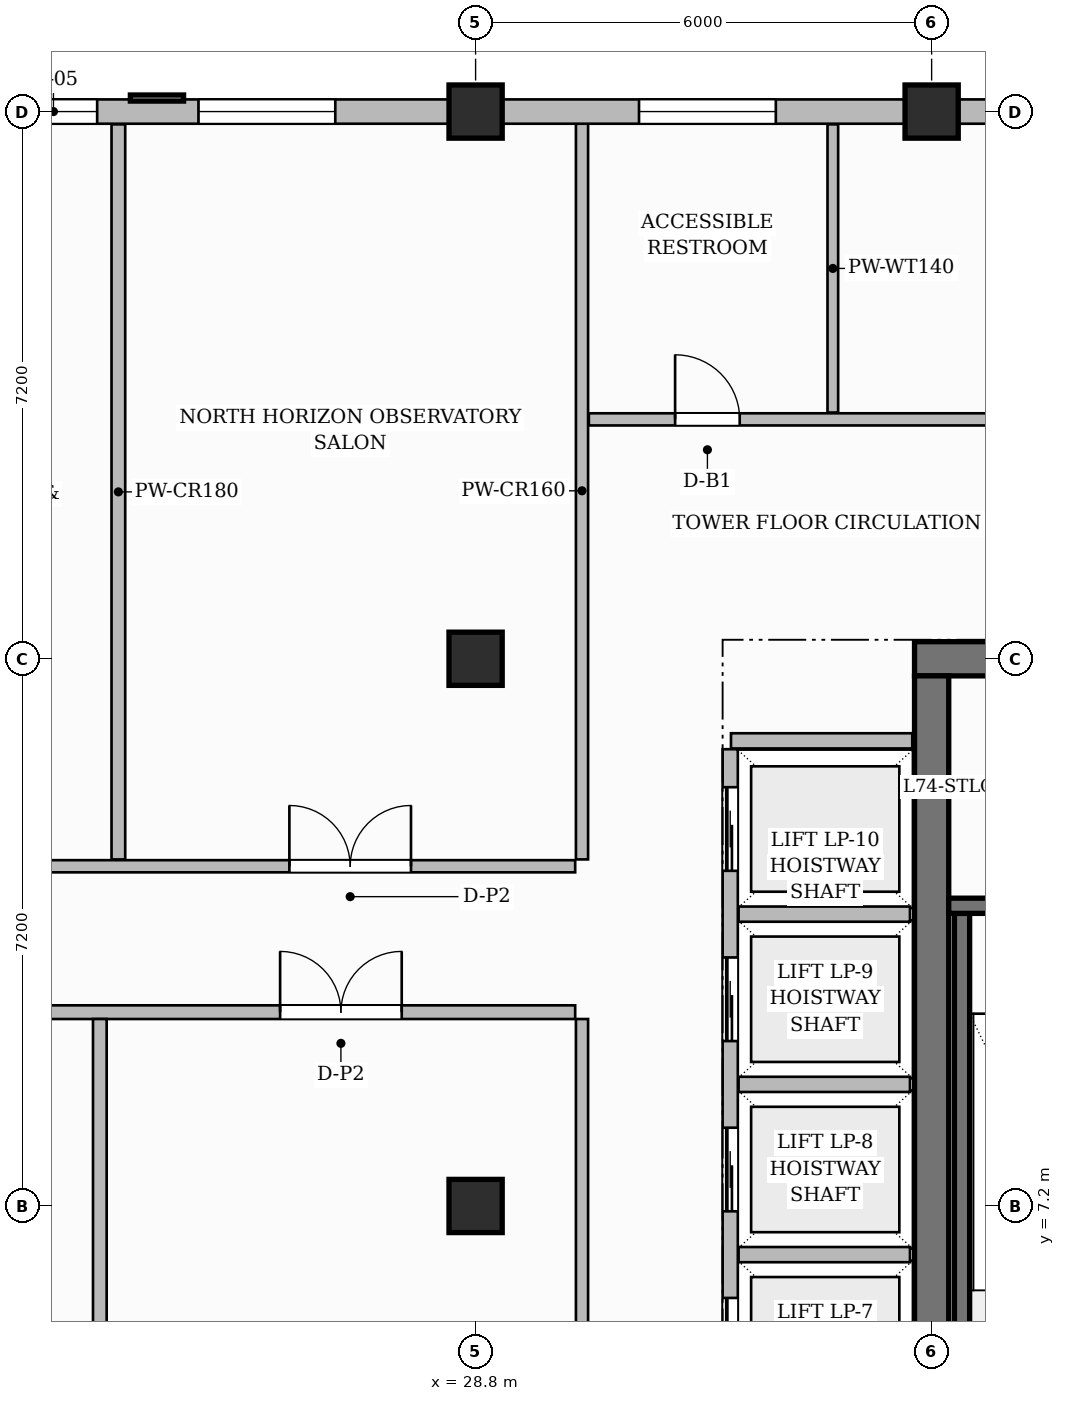
"""IFC4 building model, lengths in metres.
Left out: names, types, materials, properties, quantities, classifications, styles, units other than length and angle.
Written with IfcOpenShell. Run it as: python <this file> out.ifc"""

import sys

from ifc_helpers import new_model, si_unit, direction, frame, frame_2d, origin, origin_2d, place, context, subcontext, project, spatial, rectangle, extrude, source, transform, mapped, element, fill, save


model = new_model("IFC4")
c1 = context("Model", 3, precision=1e-05, world=origin(), true_north=direction((0.0, 1.0)))
c2 = subcontext(c1, "Body", "Model", "MODEL_VIEW")
j1 = project(units=[si_unit("LENGTHUNIT", "METRE"), si_unit("PLANEANGLEUNIT", "RADIAN")], contexts=[c1])
p1 = place(None, origin())
s1 = spatial("IfcSite", under=j1, at=p1, CompositionType="ELEMENT")
p2 = place(p1, origin())
s2 = spatial("IfcBuilding", under=s1, at=p2, CompositionType="ELEMENT")
p3 = place(p2, frame((0.0, 0.0, 294.3)))
s3 = spatial("IfcBuildingStorey", under=s2, at=p3, CompositionType="ELEMENT", Elevation=294.3)
p4 = place(p3, frame((34.575, 14.4, 0.0), z_axis=(0.0, 0.0, 1.0), x_axis=(1.0, 0.0, 0.0)))
e1 = element("IfcWall", 1, at=p4, inside=s3, PredefinedType="SHEAR", context=c2, shape_type="SweptSolid", body=[
    extrude(rectangle(XDim=15.45, YDim=0.45, at=frame_2d((7.725, 0.0))), origin(), (0.0, 0.0, 1.0), 4.8),
])
p5 = place(p4, frame((5.355, 0.0, 0.0)))
e2 = element("IfcOpeningElement", 2, at=p5, cuts=e1, PredefinedType="OPENING", context=c2, shape_type="SweptSolid", body=[
    extrude(rectangle(XDim=1.5, YDim=2.2, at=frame_2d((0.75, 1.1))), frame((0.0, 0.235, 0.0), z_axis=(0.0, -1.0, 0.0), x_axis=(1.0, 0.0, 0.0)), (0.0, 0.0, 1.0), 0.47),
])
p6 = place(p4, frame((1.57, 0.0, 0.0)))
e3 = element("IfcOpeningElement", 3, at=p6, cuts=e1, PredefinedType="OPENING", context=c2, shape_type="SweptSolid", body=[
    extrude(rectangle(XDim=1.05, YDim=2.15, at=frame_2d((0.525, 1.075))), frame((0.0, 0.235, 0.0), z_axis=(0.0, -1.0, 0.0), x_axis=(1.0, 0.0, 0.0)), (0.0, 0.0, 1.0), 0.47),
])
p7 = place(p4, frame((11.2, 0.0, 0.0)))
e4 = element("IfcOpeningElement", 4, at=p7, cuts=e1, PredefinedType="OPENING", context=c2, shape_type="SweptSolid", body=[
    extrude(rectangle(XDim=1.05, YDim=2.15, at=frame_2d((0.525, 1.075))), frame((0.0, 0.235, 0.0), z_axis=(0.0, -1.0, 0.0), x_axis=(1.0, 0.0, 0.0)), (0.0, 0.0, 1.0), 0.47),
])
p8 = place(p3, frame((34.8, 3.825, 0.0), z_axis=(0.0, 0.0, 1.0), x_axis=(0.0, 1.0, 0.0)))
e5 = element("IfcWall", 5, at=p8, inside=s3, PredefinedType="SHEAR", context=c2, shape_type="SweptSolid", body=[
    extrude(rectangle(XDim=10.35, YDim=0.45, at=frame_2d((5.175, 0.0))), origin(), (0.0, 0.0, 1.0), 4.8),
])
m1 = source(origin(), c2, "Body", "SweptSolid", [
    extrude(rectangle(XDim=0.7, YDim=0.7, at=origin_2d()), origin(), (0.0, 0.0, 1.0), 4.8),
])
for number, where, z_axis, x_axis in (
    (6, (28.8, 7.2, 0.0), (0.0, 0.0, 1.0), (1.0, 0.0, 0.0)),
    (7, (28.8, 14.4, 0.0), (0.0, 0.0, 1.0), (1.0, 0.0, 0.0)),
    (8, (28.8, 21.6, 0.0), (0.0, 0.0, 1.0), (1.0, 0.0, 0.0)),
    (9, (34.8, 21.6, 0.0), (0.0, 0.0, 1.0), (1.0, 0.0, 0.0)),
):
    element("IfcColumn", number, at=place(p3, frame(where, z_axis=z_axis, x_axis=x_axis)), inside=s3, PredefinedType="COLUMN", context=c2, shape_type="MappedRepresentation", body=[
        mapped(m1, transform((0.0, 0.0, 0.0), scale=1.0)),
    ])
p9 = place(p3, frame((35.2, 4.1, 0.0), z_axis=(0.0, 0.0, 1.0), x_axis=(0.0, 1.0, 0.0)))
e10 = element("IfcWall", 10, at=p9, inside=s3, PredefinedType="SHEAR", context=c2, shape_type="SweptSolid", body=[
    extrude(rectangle(XDim=6.95, YDim=0.2, at=frame_2d((3.475, 0.0))), origin(), (0.0, 0.0, 1.0), 4.8),
])
p10 = place(p3, frame((35.025, 11.15, 0.0), z_axis=(0.0, 0.0, 1.0), x_axis=(1.0, 0.0, 0.0)))
e11 = element("IfcWall", 11, at=p10, inside=s3, PredefinedType="SHEAR", context=c2, shape_type="SweptSolid", body=[
    extrude(rectangle(XDim=3.215, YDim=0.2, at=frame_2d((1.607, 0.0))), origin(), (0.0, 0.0, 1.0), 4.8),
])
p11 = place(p10, frame((1.12, 0.0, 0.0)))
e12 = element("IfcOpeningElement", 12, at=p11, cuts=e11, PredefinedType="OPENING", context=c2, shape_type="SweptSolid", body=[
    extrude(rectangle(XDim=1.05, YDim=2.2, at=frame_2d((0.525, 1.1))), frame((0.0, 0.11, 0.0), z_axis=(0.0, -1.0, 0.0), x_axis=(1.0, 0.0, 0.0)), (0.0, 0.0, 1.0), 0.22),
])
p12 = place(p3, frame((32.16, 13.32, 0.0), z_axis=(0.0, 0.0, 1.0), x_axis=(1.0, 0.0, 0.0)))
e13 = element("IfcWall", 13, at=p12, inside=s3, PredefinedType="PARTITIONING", context=c2, shape_type="SweptSolid", body=[
    extrude(rectangle(XDim=2.385, YDim=0.2, at=frame_2d((1.192, 0.0))), origin(), (0.0, 0.0, 1.0), 4.5),
])
p13 = place(p3, frame((32.15, 4.39, 0.0), z_axis=(0.0, 0.0, 1.0), x_axis=(0.0, 1.0, 0.0)))
e14 = element("IfcWall", 14, at=p13, inside=s3, PredefinedType="PARTITIONING", context=c2, shape_type="SweptSolid", body=[
    extrude(rectangle(XDim=8.82, YDim=0.2, at=frame_2d((4.41, 0.0))), origin(), (0.0, 0.0, 1.0), 4.5),
])
p14 = place(p13, frame((0.5, 0.0, 0.0)))
e15 = element("IfcOpeningElement", 15, at=p14, cuts=e14, PredefinedType="OPENING", context=c2, shape_type="SweptSolid", body=[
    extrude(rectangle(XDim=1.1, YDim=2.2, at=frame_2d((0.55, 1.1))), frame((0.0, 0.11, 0.0), z_axis=(0.0, -1.0, 0.0), x_axis=(1.0, 0.0, 0.0)), (0.0, 0.0, 1.0), 0.22),
])
p15 = place(p13, frame((2.74, 0.0, 0.0)))
e16 = element("IfcOpeningElement", 16, at=p15, cuts=e14, PredefinedType="OPENING", context=c2, shape_type="SweptSolid", body=[
    extrude(rectangle(XDim=1.1, YDim=2.2, at=frame_2d((0.55, 1.1))), frame((0.0, 0.11, 0.0), z_axis=(0.0, -1.0, 0.0), x_axis=(1.0, 0.0, 0.0)), (0.0, 0.0, 1.0), 0.22),
])
p16 = place(p13, frame((4.98, 0.0, 0.0)))
e17 = element("IfcOpeningElement", 17, at=p16, cuts=e14, PredefinedType="OPENING", context=c2, shape_type="SweptSolid", body=[
    extrude(rectangle(XDim=1.1, YDim=2.2, at=frame_2d((0.55, 1.1))), frame((0.0, 0.11, 0.0), z_axis=(0.0, -1.0, 0.0), x_axis=(1.0, 0.0, 0.0)), (0.0, 0.0, 1.0), 0.22),
])
p17 = place(p13, frame((7.22, 0.0, 0.0)))
e18 = element("IfcOpeningElement", 18, at=p17, cuts=e14, PredefinedType="OPENING", context=c2, shape_type="SweptSolid", body=[
    extrude(rectangle(XDim=1.1, YDim=2.2, at=frame_2d((0.55, 1.1))), frame((0.0, 0.11, 0.0), z_axis=(0.0, -1.0, 0.0), x_axis=(1.0, 0.0, 0.0)), (0.0, 0.0, 1.0), 0.22),
])
for number, where, z_axis, x_axis in (
    (19, (32.26, 6.56, 0.0), (0.0, 0.0, 1.0), (1.0, 0.0, 0.0)),
    (20, (32.26, 8.8, 0.0), (0.0, 0.0, 1.0), (1.0, 0.0, 0.0)),
    (21, (32.26, 11.04, 0.0), (0.0, 0.0, 1.0), (1.0, 0.0, 0.0)),
):
    element("IfcWall", number, at=place(p3, frame(where, z_axis=z_axis, x_axis=x_axis)), inside=s3, PredefinedType="PARTITIONING", context=c2, shape_type="SweptSolid", body=[
        extrude(rectangle(XDim=2.255, YDim=0.2, at=frame_2d((1.127, 0.0))), origin(), (0.0, 0.0, 1.0), 4.5),
    ])
p18 = place(p3, frame((18.168, 9.75, 0.0), z_axis=(0.0, 0.0, 1.0), x_axis=(1.0, 0.0, 0.0)))
e22 = element("IfcWall", 22, at=p18, inside=s3, PredefinedType="PARTITIONING", context=c2, shape_type="SweptSolid", body=[
    extrude(rectangle(XDim=11.942, YDim=0.18, at=frame_2d((5.971, 0.0))), origin(), (0.0, 0.0, 1.0), 4.5),
])
p19 = place(p18, frame((1.96, 0.0, 0.0)))
e23 = element("IfcOpeningElement", 23, at=p19, cuts=e22, PredefinedType="OPENING", context=c2, shape_type="SweptSolid", body=[
    extrude(rectangle(XDim=1.6, YDim=2.4, at=frame_2d((0.8, 1.2))), frame((0.0, 0.1, 0.0), z_axis=(0.0, -1.0, 0.0), x_axis=(1.0, 0.0, 0.0)), (0.0, 0.0, 1.0), 0.2),
])
p20 = place(p18, frame((8.06, 0.0, 0.0)))
e24 = element("IfcOpeningElement", 24, at=p20, cuts=e22, PredefinedType="OPENING", context=c2, shape_type="SweptSolid", body=[
    extrude(rectangle(XDim=1.6, YDim=2.4, at=frame_2d((0.8, 1.2))), frame((0.0, 0.1, 0.0), z_axis=(0.0, -1.0, 0.0), x_axis=(1.0, 0.0, 0.0)), (0.0, 0.0, 1.0), 0.2),
])
p21 = place(p3, frame((18.168, 11.67, 0.0), z_axis=(0.0, 0.0, 1.0), x_axis=(1.0, 0.0, 0.0)))
e25 = element("IfcWall", 25, at=p21, inside=s3, PredefinedType="PARTITIONING", context=c2, shape_type="SweptSolid", body=[
    extrude(rectangle(XDim=11.942, YDim=0.16, at=frame_2d((5.971, 0.0))), origin(), (0.0, 0.0, 1.0), 4.5),
])
p22 = place(p21, frame((2.082, 0.0, 0.0)))
e26 = element("IfcOpeningElement", 26, at=p22, cuts=e25, PredefinedType="OPENING", context=c2, shape_type="SweptSolid", body=[
    extrude(rectangle(XDim=1.6, YDim=2.4, at=frame_2d((0.8, 1.2))), frame((0.0, 0.09, 0.0), z_axis=(0.0, -1.0, 0.0), x_axis=(1.0, 0.0, 0.0)), (0.0, 0.0, 1.0), 0.18),
])
p23 = place(p21, frame((8.182, 0.0, 0.0)))
e27 = element("IfcOpeningElement", 27, at=p23, cuts=e25, PredefinedType="OPENING", context=c2, shape_type="SweptSolid", body=[
    extrude(rectangle(XDim=1.6, YDim=2.4, at=frame_2d((0.8, 1.2))), frame((0.0, 0.09, 0.0), z_axis=(0.0, -1.0, 0.0), x_axis=(1.0, 0.0, 0.0)), (0.0, 0.0, 1.0), 0.18),
])
p24 = place(p3, frame((30.2, 11.76, 0.0), z_axis=(0.0, 0.0, 1.0), x_axis=(0.0, 1.0, 0.0)))
e28 = element("IfcWall", 28, at=p24, inside=s3, PredefinedType="PARTITIONING", context=c2, shape_type="SweptSolid", body=[
    extrude(rectangle(XDim=9.7, YDim=0.16, at=frame_2d((4.85, 0.0))), origin(), (0.0, 0.0, 1.0), 4.5),
])
p25 = place(p3, frame((30.29, 17.55, 0.0), z_axis=(0.0, 0.0, 1.0), x_axis=(1.0, 0.0, 0.0)))
e29 = element("IfcWall", 29, at=p25, inside=s3, PredefinedType="PARTITIONING", context=c2, shape_type="SweptSolid", body=[
    extrude(rectangle(XDim=19.37, YDim=0.16, at=frame_2d((9.685, 0.0))), origin(), (0.0, 0.0, 1.0), 4.5),
])
p26 = place(p25, frame((1.135, 0.0, 0.0)))
e30 = element("IfcOpeningElement", 30, at=p26, cuts=e29, PredefinedType="OPENING", context=c2, shape_type="SweptSolid", body=[
    extrude(rectangle(XDim=0.85, YDim=2.1, at=frame_2d((0.425, 1.05))), frame((0.0, 0.09, 0.0), z_axis=(0.0, -1.0, 0.0), x_axis=(1.0, 0.0, 0.0)), (0.0, 0.0, 1.0), 0.18),
])
p27 = place(p25, frame((5.71, 0.0, 0.0)))
e31 = element("IfcOpeningElement", 31, at=p27, cuts=e29, PredefinedType="OPENING", context=c2, shape_type="SweptSolid", body=[
    extrude(rectangle(XDim=0.9, YDim=2.15, at=frame_2d((0.45, 1.075))), frame((0.0, 0.09, 0.0), z_axis=(0.0, -1.0, 0.0), x_axis=(1.0, 0.0, 0.0)), (0.0, 0.0, 1.0), 0.18),
])
p28 = place(p25, frame((10.635, 0.0, 0.0)))
e32 = element("IfcOpeningElement", 32, at=p28, cuts=e29, PredefinedType="OPENING", context=c2, shape_type="SweptSolid", body=[
    extrude(rectangle(XDim=0.95, YDim=2.15, at=frame_2d((0.475, 1.075))), frame((0.0, 0.09, 0.0), z_axis=(0.0, -1.0, 0.0), x_axis=(1.0, 0.0, 0.0)), (0.0, 0.0, 1.0), 0.18),
])
p29 = place(p25, frame((16.235, 0.0, 0.0)))
e33 = element("IfcOpeningElement", 33, at=p29, cuts=e29, PredefinedType="OPENING", context=c2, shape_type="SweptSolid", body=[
    extrude(rectangle(XDim=0.95, YDim=2.15, at=frame_2d((0.475, 1.075))), frame((0.0, 0.09, 0.0), z_axis=(0.0, -1.0, 0.0), x_axis=(1.0, 0.0, 0.0)), (0.0, 0.0, 1.0), 0.18),
])
p30 = place(p3, frame((30.2, 0.168, 0.0), z_axis=(0.0, 0.0, 1.0), x_axis=(0.0, 1.0, 0.0)))
e34 = element("IfcWall", 34, at=p30, inside=s3, PredefinedType="PARTITIONING", context=c2, shape_type="SweptSolid", body=[
    extrude(rectangle(XDim=9.492, YDim=0.16, at=frame_2d((4.746, 0.0))), origin(), (0.0, 0.0, 1.0), 4.5),
])
p31 = place(p30, frame((1.957, 0.0, 0.0)))
e35 = element("IfcOpeningElement", 35, at=p31, cuts=e34, PredefinedType="OPENING", context=c2, shape_type="SweptSolid", body=[
    extrude(rectangle(XDim=1.05, YDim=2.15, at=frame_2d((0.525, 1.075))), frame((0.0, 0.09, 0.0), z_axis=(0.0, -1.0, 0.0), x_axis=(1.0, 0.0, 0.0)), (0.0, 0.0, 1.0), 0.18),
])
p32 = place(p3, frame((33.5, 17.64, 0.0), z_axis=(0.0, 0.0, 1.0), x_axis=(0.0, 1.0, 0.0)))
e36 = element("IfcWall", 36, at=p32, inside=s3, PredefinedType="PARTITIONING", context=c2, shape_type="SweptSolid", body=[
    extrude(rectangle(XDim=3.792, YDim=0.14, at=frame_2d((1.896, 0.0))), origin(), (0.0, 0.0, 1.0), 4.5),
])
p33 = place(p3, frame((23.856, 0.168, 0.0), z_axis=(0.0, 0.0, 1.0), x_axis=(0.0, 1.0, 0.0)))
e37 = element("IfcWall", 37, at=p33, inside=s3, PredefinedType="PARTITIONING", context=c2, shape_type="SweptSolid", body=[
    extrude(rectangle(XDim=9.492, YDim=0.18, at=frame_2d((4.746, 0.0))), origin(), (0.0, 0.0, 1.0), 4.5),
])
p34 = place(p3, frame((24.1, 11.76, 0.0), z_axis=(0.0, 0.0, 1.0), x_axis=(0.0, 1.0, 0.0)))
e38 = element("IfcWall", 38, at=p34, inside=s3, PredefinedType="PARTITIONING", context=c2, shape_type="SweptSolid", body=[
    extrude(rectangle(XDim=9.672, YDim=0.18, at=frame_2d((4.836, 0.0))), origin(), (0.0, 0.0, 1.0), 4.5),
])
p35 = place(p3, frame((18.0, 21.6, 0.0), z_axis=(0.0, 0.0, 1.0), x_axis=(1.0, 0.0, 0.0)))
e39 = element("IfcWall", 39, at=p35, inside=s3, PredefinedType="SOLIDWALL", context=c2, shape_type="SweptSolid", body=[
    extrude(rectangle(XDim=31.8, YDim=0.32, at=frame_2d((15.9, 0.0))), origin(), (0.0, 0.0, 1.0), 3.785),
])
p36 = place(p35, frame((0.42, 0.0, 0.0)))
e40 = element("IfcOpeningElement", 40, at=p36, cuts=e39, PredefinedType="OPENING", context=c2, shape_type="SweptSolid", body=[
    extrude(rectangle(XDim=1.2, YDim=2.2, at=frame_2d((0.6, 1.1))), frame((0.0, 0.17, 0.0), z_axis=(0.0, -1.0, 0.0), x_axis=(1.0, 0.0, 0.0)), (0.0, 0.0, 1.0), 0.34),
])
p37 = place(p35, frame((4.671, 0.0, 0.8)))
e41 = element("IfcOpeningElement", 41, at=p37, cuts=e39, PredefinedType="OPENING", context=c2, shape_type="SweptSolid", body=[
    extrude(rectangle(XDim=1.15, YDim=1.8, at=frame_2d((0.575, 0.9))), frame((0.0, 0.17, 0.0), z_axis=(0.0, -1.0, 0.0), x_axis=(1.0, 0.0, 0.0)), (0.0, 0.0, 1.0), 0.34),
])
p38 = place(p35, frame((7.154, 0.0, 0.8)))
e42 = element("IfcOpeningElement", 42, at=p38, cuts=e39, PredefinedType="OPENING", context=c2, shape_type="SweptSolid", body=[
    extrude(rectangle(XDim=1.8, YDim=1.85, at=frame_2d((0.9, 0.925))), frame((0.0, 0.17, 0.0), z_axis=(0.0, -1.0, 0.0), x_axis=(1.0, 0.0, 0.0)), (0.0, 0.0, 1.0), 0.34),
])
p39 = place(p35, frame((12.95, 0.0, 0.8)))
e43 = element("IfcOpeningElement", 43, at=p39, cuts=e39, PredefinedType="OPENING", context=c2, shape_type="SweptSolid", body=[
    extrude(rectangle(XDim=1.8, YDim=1.85, at=frame_2d((0.9, 0.925))), frame((0.0, 0.17, 0.0), z_axis=(0.0, -1.0, 0.0), x_axis=(1.0, 0.0, 0.0)), (0.0, 0.0, 1.0), 0.34),
])
p40 = place(p35, frame((18.596, 0.0, 0.8)))
e44 = element("IfcOpeningElement", 44, at=p40, cuts=e39, PredefinedType="OPENING", context=c2, shape_type="SweptSolid", body=[
    extrude(rectangle(XDim=1.8, YDim=1.85, at=frame_2d((0.9, 0.925))), frame((0.0, 0.17, 0.0), z_axis=(0.0, -1.0, 0.0), x_axis=(1.0, 0.0, 0.0)), (0.0, 0.0, 1.0), 0.34),
])
p41 = place(p35, frame((21.729, 0.0, 0.8)))
e45 = element("IfcOpeningElement", 45, at=p41, cuts=e39, PredefinedType="OPENING", context=c2, shape_type="SweptSolid", body=[
    extrude(rectangle(XDim=1.15, YDim=1.8, at=frame_2d((0.575, 0.9))), frame((0.0, 0.17, 0.0), z_axis=(0.0, -1.0, 0.0), x_axis=(1.0, 0.0, 0.0)), (0.0, 0.0, 1.0), 0.34),
])
p42 = place(p35, frame((25.121, 0.0, 0.8)))
e46 = element("IfcOpeningElement", 46, at=p42, cuts=e39, PredefinedType="OPENING", context=c2, shape_type="SweptSolid", body=[
    extrude(rectangle(XDim=0.95, YDim=1.75, at=frame_2d((0.475, 0.875))), frame((0.0, 0.17, 0.0), z_axis=(0.0, -1.0, 0.0), x_axis=(1.0, 0.0, 0.0)), (0.0, 0.0, 1.0), 0.34),
])
p43 = place(p35, frame((27.804, 0.0, 0.8)))
e47 = element("IfcOpeningElement", 47, at=p43, cuts=e39, PredefinedType="OPENING", context=c2, shape_type="SweptSolid", body=[
    extrude(rectangle(XDim=1.8, YDim=1.85, at=frame_2d((0.9, 0.925))), frame((0.0, 0.17, 0.0), z_axis=(0.0, -1.0, 0.0), x_axis=(1.0, 0.0, 0.0)), (0.0, 0.0, 1.0), 0.34),
])
m2 = source(origin(), c2, "Body", "SweptSolid", [
    extrude(rectangle(XDim=0.85, YDim=2.1, at=frame_2d((0.425, 1.05))), frame((0.0, 0.025, 0.0), z_axis=(0.0, -1.0, 0.0), x_axis=(1.0, 0.0, 0.0)), (0.0, 0.0, 1.0), 0.05),
])
p44 = place(p26, origin())
e48 = element("IfcDoor", 48, at=p44, inside=s3, OperationType="SINGLE_SWING_LEFT", PredefinedType="DOOR", context=c2, shape_type="MappedRepresentation", body=[
    mapped(m2, transform((0.0, 0.0, 0.0), scale=1.0)),
])
fill(e30, e48)
m3 = source(origin(), c2, "Body", "SweptSolid", [
    extrude(rectangle(XDim=1.6, YDim=2.4, at=frame_2d((0.8, 1.2))), frame((0.0, 0.025, 0.0), z_axis=(0.0, -1.0, 0.0), x_axis=(1.0, 0.0, 0.0)), (0.0, 0.0, 1.0), 0.05),
])
p45 = place(p20, origin())
e49 = element("IfcDoor", 49, at=p45, inside=s3, OperationType="DOUBLE_DOOR_SINGLE_SWING", PredefinedType="DOOR", context=c2, shape_type="MappedRepresentation", body=[
    mapped(m3, transform((0.0, 0.0, 0.0), scale=1.0)),
])
fill(e24, e49)
p46 = place(p23, origin())
e50 = element("IfcDoor", 50, at=p46, inside=s3, OperationType="DOUBLE_DOOR_SINGLE_SWING", PredefinedType="DOOR", context=c2, shape_type="MappedRepresentation", body=[
    mapped(m3, transform((0.0, 0.0, 0.0), scale=1.0)),
])
fill(e27, e50)
m4 = source(origin(), c2, "Body", "SweptSolid", [
    extrude(rectangle(XDim=1.1, YDim=2.2, at=frame_2d((0.55, 1.1))), frame((0.0, 0.025, 0.0), z_axis=(0.0, -1.0, 0.0), x_axis=(1.0, 0.0, 0.0)), (0.0, 0.0, 1.0), 0.05),
])
p47 = place(p14, origin())
e51 = element("IfcDoor", 51, at=p47, inside=s3, OperationType="SLIDING_TO_LEFT", PredefinedType="DOOR", context=c2, shape_type="MappedRepresentation", body=[
    mapped(m4, transform((0.0, 0.0, 0.0), scale=1.0)),
])
fill(e15, e51)
p48 = place(p15, origin())
e52 = element("IfcDoor", 52, at=p48, inside=s3, OperationType="SLIDING_TO_LEFT", PredefinedType="DOOR", context=c2, shape_type="MappedRepresentation", body=[
    mapped(m4, transform((0.0, 0.0, 0.0), scale=1.0)),
])
fill(e16, e52)
p49 = place(p16, origin())
e53 = element("IfcDoor", 53, at=p49, inside=s3, OperationType="SLIDING_TO_LEFT", PredefinedType="DOOR", context=c2, shape_type="MappedRepresentation", body=[
    mapped(m4, transform((0.0, 0.0, 0.0), scale=1.0)),
])
fill(e17, e53)
p50 = place(p17, origin())
e54 = element("IfcDoor", 54, at=p50, inside=s3, OperationType="SLIDING_TO_LEFT", PredefinedType="DOOR", context=c2, shape_type="MappedRepresentation", body=[
    mapped(m4, transform((0.0, 0.0, 0.0), scale=1.0)),
])
fill(e18, e54)
m5 = source(origin(), c2, "Body", "SweptSolid", [
    extrude(rectangle(XDim=1.15, YDim=1.8, at=frame_2d((0.575, 0.9))), frame((0.0, 0.03, 0.0), z_axis=(0.0, -1.0, 0.0), x_axis=(1.0, 0.0, 0.0)), (0.0, 0.0, 1.0), 0.06),
])
p51 = place(p37, origin())
e55 = element("IfcWindow", 55, at=p51, inside=s3, PartitioningType="SINGLE_PANEL", PredefinedType="WINDOW", context=c2, shape_type="MappedRepresentation", body=[
    mapped(m5, transform((0.0, 0.0, 0.0), scale=1.0)),
])
fill(e41, e55)
m6 = source(origin(), c2, "Body", "SweptSolid", [
    extrude(rectangle(XDim=1.8, YDim=1.85, at=frame_2d((0.9, 0.925))), frame((0.0, 0.03, 0.0), z_axis=(0.0, -1.0, 0.0), x_axis=(1.0, 0.0, 0.0)), (0.0, 0.0, 1.0), 0.06),
])
p52 = place(p38, origin())
e56 = element("IfcWindow", 56, at=p52, inside=s3, PartitioningType="DOUBLE_PANEL_VERTICAL", PredefinedType="WINDOW", context=c2, shape_type="MappedRepresentation", body=[
    mapped(m6, transform((0.0, 0.0, 0.0), scale=1.0)),
])
fill(e42, e56)
p53 = place(p39, origin())
e57 = element("IfcWindow", 57, at=p53, inside=s3, PartitioningType="DOUBLE_PANEL_VERTICAL", PredefinedType="WINDOW", context=c2, shape_type="MappedRepresentation", body=[
    mapped(m6, transform((0.0, 0.0, 0.0), scale=1.0)),
])
fill(e43, e57)
save(model, sys.argv[1])
